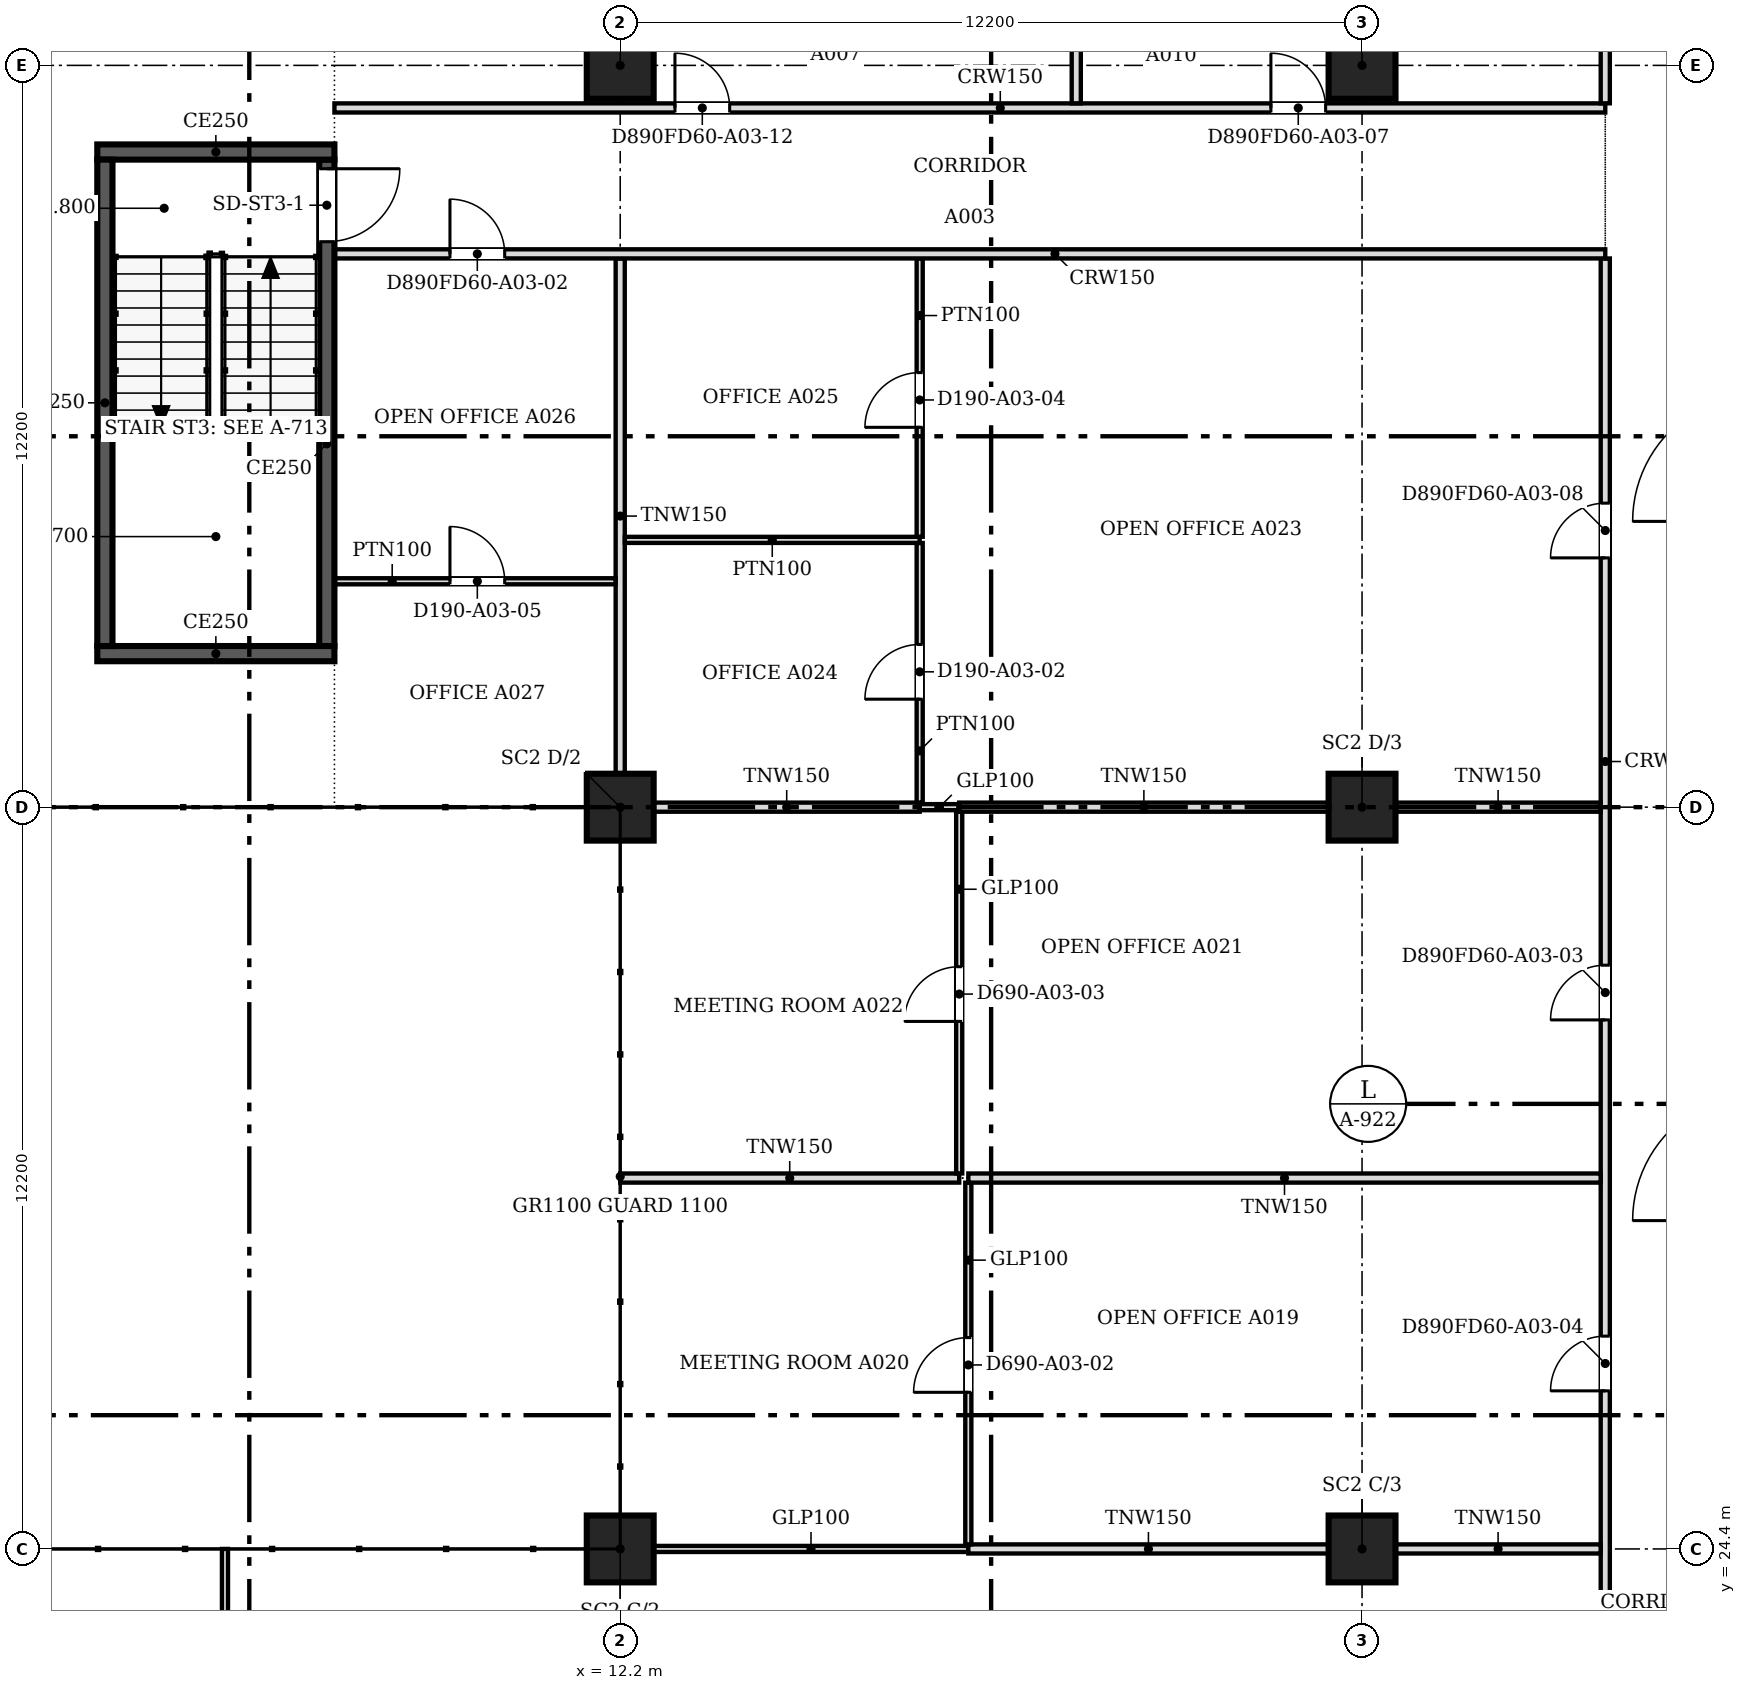
"""IFC4 building model, lengths in metres.
Left out: names, types, materials, properties, quantities, classifications, styles, units other than length and angle.
Written with IfcOpenShell. Run it as: python <this file> out.ifc"""

import sys

from ifc_helpers import new_model, si_unit, direction, frame, frame_2d, origin, origin_2d, place, context, subcontext, project, spatial, rectangle, extrude, source, transform, mapped, element, fill, save


model = new_model("IFC4")
c1 = context("Model", 3, precision=1e-05, world=origin(), true_north=direction((0.0, 1.0)))
c2 = subcontext(c1, "Body", "Model", "MODEL_VIEW")
j1 = project(units=[si_unit("LENGTHUNIT", "METRE"), si_unit("PLANEANGLEUNIT", "RADIAN")], contexts=[c1])
p1 = place(None, origin())
s1 = spatial("IfcSite", under=j1, at=p1, CompositionType="ELEMENT")
p2 = place(p1, origin())
s2 = spatial("IfcBuilding", under=s1, at=p2, CompositionType="ELEMENT")
p3 = place(p2, frame((0.0, 0.0, 41.0)))
s3 = spatial("IfcBuildingStorey", under=s2, at=p3, CompositionType="ELEMENT", Elevation=41.0)
for number, where, z_axis, x_axis in (
    (1, (12.2, 24.4, 0.0), (0.0, 0.0, 1.0), (1.0, 0.0, 0.0)),
    (2, (12.2, 36.6, 0.0), (0.0, 0.0, 1.0), (1.0, 0.0, 0.0)),
    (3, (12.2, 48.8, 0.0), (0.0, 0.0, 1.0), (1.0, 0.0, 0.0)),
    (4, (24.4, 24.4, 0.0), (0.0, 0.0, 1.0), (1.0, 0.0, 0.0)),
    (5, (24.4, 36.6, 0.0), (0.0, 0.0, 1.0), (1.0, 0.0, 0.0)),
    (6, (24.4, 48.8, 0.0), (0.0, 0.0, 1.0), (1.0, 0.0, 0.0)),
):
    element("IfcColumn", number, at=place(p3, frame(where, z_axis=z_axis, x_axis=x_axis)), inside=s3, PredefinedType="COLUMN", context=c2, shape_type="SweptSolid", body=[
        extrude(rectangle(XDim=1.1, YDim=1.1, at=origin_2d()), origin(), (0.0, 0.0, 1.0), 3.6),
    ])
p4 = place(p3, frame((7.5, 39.125, 0.0), z_axis=(0.0, 0.0, 1.0), x_axis=(-1.0, 0.0, 0.0)))
e7 = element("IfcWall", 7, at=p4, inside=s3, PredefinedType="SOLIDWALL", context=c2, shape_type="SweptSolid", body=[
    extrude(rectangle(XDim=3.9, YDim=0.25, at=frame_2d((1.95, 0.0))), origin(), (0.0, 0.0, 1.0), 3.8),
])
p5 = place(p3, frame((3.725, 39.25, 0.0), z_axis=(0.0, 0.0, 1.0), x_axis=(0.0, 1.0, 0.0)))
e8 = element("IfcWall", 8, at=p5, inside=s3, PredefinedType="SOLIDWALL", context=c2, shape_type="SweptSolid", body=[
    extrude(rectangle(XDim=8.0, YDim=0.25, at=frame_2d((4.0, 0.0))), origin(), (0.0, 0.0, 1.0), 3.8),
])
p6 = place(p3, frame((3.6, 47.375, 0.0), z_axis=(0.0, 0.0, 1.0), x_axis=(1.0, 0.0, 0.0)))
e9 = element("IfcWall", 9, at=p6, inside=s3, PredefinedType="SOLIDWALL", context=c2, shape_type="SweptSolid", body=[
    extrude(rectangle(XDim=3.9, YDim=0.25, at=frame_2d((1.95, 0.0))), origin(), (0.0, 0.0, 1.0), 3.8),
])
p7 = place(p3, frame((7.375, 47.25, 0.0), z_axis=(0.0, 0.0, 1.0), x_axis=(0.0, -1.0, 0.0)))
e10 = element("IfcWall", 10, at=p7, inside=s3, PredefinedType="SOLIDWALL", context=c2, shape_type="SweptSolid", body=[
    extrude(rectangle(XDim=8.0, YDim=0.25, at=frame_2d((4.0, 0.0))), origin(), (0.0, 0.0, 1.0), 3.8),
])
m1 = source(origin(), c2, "Body", "SweptSolid", [
    extrude(rectangle(XDim=1.2, YDim=2.1, at=frame_2d((0.6, 1.05))), frame((0.0, 0.135, 0.0), z_axis=(0.0, -1.0, 0.0), x_axis=(1.0, 0.0, 0.0)), (0.0, 0.0, 1.0), 0.27),
])
p8 = place(p7, frame((0.15, 0.0, 0.0)))
e11 = element("IfcOpeningElement", 11, at=p8, cuts=e10, PredefinedType="OPENING", context=c2, shape_type="MappedRepresentation", body=[
    mapped(m1, transform((0.0, 0.0, 0.0), scale=1.0)),
])
p9 = place(p3, frame((28.4, 18.8, 0.0), z_axis=(0.0, 0.0, 1.0), x_axis=(0.0, 1.0, 0.0)))
e12 = element("IfcWall", 12, at=p9, inside=s3, PredefinedType="PARTITIONING", context=c2, shape_type="SweptSolid", body=[
    extrude(rectangle(XDim=26.824, YDim=0.15, at=frame_2d((13.412, 0.0))), origin(), (0.0, 0.0, 1.0), 3.067),
])
m2 = source(origin(), c2, "Body", "SweptSolid", [
    extrude(rectangle(XDim=0.9, YDim=2.1, at=frame_2d((0.45, 1.05))), frame((0.0, 0.085, 0.0), z_axis=(0.0, -1.0, 0.0), x_axis=(1.0, 0.0, 0.0)), (0.0, 0.0, 1.0), 0.17),
])
p10 = place(p9, frame((1.3, 0.0, 0.0)))
e13 = element("IfcOpeningElement", 13, at=p10, cuts=e12, PredefinedType="OPENING", context=c2, shape_type="MappedRepresentation", body=[
    mapped(m2, transform((0.0, 0.0, 0.0), scale=1.0)),
])
p11 = place(p9, frame((14.301, 0.0, 0.0)))
e14 = element("IfcOpeningElement", 14, at=p11, cuts=e12, PredefinedType="OPENING", context=c2, shape_type="MappedRepresentation", body=[
    mapped(m2, transform((0.0, 0.0, 0.0), scale=1.0)),
])
p12 = place(p9, frame((8.2, 0.0, 0.0)))
e15 = element("IfcOpeningElement", 15, at=p12, cuts=e12, PredefinedType="OPENING", context=c2, shape_type="MappedRepresentation", body=[
    mapped(m2, transform((0.0, 0.0, 0.0), scale=1.0)),
])
p13 = place(p9, frame((21.9, 0.0, 0.0)))
e16 = element("IfcOpeningElement", 16, at=p13, cuts=e12, PredefinedType="OPENING", context=c2, shape_type="MappedRepresentation", body=[
    mapped(m2, transform((0.0, 0.0, 0.0), scale=1.0)),
])
p14 = place(p3, frame((5.7, 18.99, 0.0), z_axis=(0.0, 0.0, 1.0), x_axis=(0.0, 1.0, 0.0)))
e17 = element("IfcWall", 17, at=p14, inside=s3, PredefinedType="PARTITIONING", context=c2, shape_type="SweptSolid", body=[
    extrude(rectangle(XDim=5.41, YDim=0.1, at=frame_2d((2.705, 0.0))), origin(), (0.0, 0.0, 1.0), 3.067),
])
m3 = source(origin(), c2, "Body", "SweptSolid", [
    extrude(rectangle(XDim=0.9, YDim=2.1, at=frame_2d((0.45, 1.05))), frame((0.0, 0.06, 0.0), z_axis=(0.0, -1.0, 0.0), x_axis=(1.0, 0.0, 0.0)), (0.0, 0.0, 1.0), 0.12),
])
p15 = place(p14, frame((2.3, 0.0, 0.0)))
e18 = element("IfcOpeningElement", 18, at=p15, cuts=e17, PredefinedType="OPENING", context=c2, shape_type="MappedRepresentation", body=[
    mapped(m3, transform((0.0, 0.0, 0.0), scale=1.0)),
])
p16 = place(p3, frame((12.751, 24.4, 0.0), z_axis=(0.0, 0.0, 1.0), x_axis=(1.0, 0.0, 0.0)))
e19 = element("IfcWall", 19, at=p16, inside=s3, PredefinedType="PARTITIONING", context=c2, shape_type="SweptSolid", body=[
    extrude(rectangle(XDim=5.173, YDim=0.1, at=frame_2d((2.586, 0.0))), origin(), (0.0, 0.0, 1.0), 3.067),
])
p17 = place(p3, frame((17.925, 24.4, 0.0), z_axis=(0.0, 0.0, 1.0), x_axis=(1.0, 0.0, 0.0)))
e20 = element("IfcWall", 20, at=p17, inside=s3, PredefinedType="PARTITIONING", context=c2, shape_type="SweptSolid", body=[
    extrude(rectangle(XDim=5.924, YDim=0.15, at=frame_2d((2.962, 0.0))), origin(), (0.0, 0.0, 1.0), 3.067),
])
p18 = place(p3, frame((24.951, 24.4, 0.0), z_axis=(0.0, 0.0, 1.0), x_axis=(1.0, 0.0, 0.0)))
e21 = element("IfcWall", 21, at=p18, inside=s3, PredefinedType="PARTITIONING", context=c2, shape_type="SweptSolid", body=[
    extrude(rectangle(XDim=3.373, YDim=0.15, at=frame_2d((1.687, 0.0))), origin(), (0.0, 0.0, 1.0), 3.067),
])
p19 = place(p3, frame((17.925, 24.476, 0.0), z_axis=(0.0, 0.0, 1.0), x_axis=(0.0, 1.0, 0.0)))
e22 = element("IfcWall", 22, at=p19, inside=s3, PredefinedType="PARTITIONING", context=c2, shape_type="SweptSolid", body=[
    extrude(rectangle(XDim=5.948, YDim=0.1, at=frame_2d((2.974, 0.0))), origin(), (0.0, 0.0, 1.0), 3.067),
])
p20 = place(p19, frame((2.5, 0.0, 0.0)))
e23 = element("IfcOpeningElement", 23, at=p20, cuts=e22, PredefinedType="OPENING", context=c2, shape_type="MappedRepresentation", body=[
    mapped(m3, transform((0.0, 0.0, 0.0), scale=1.0)),
])
p21 = place(p3, frame((12.2, 30.5, 0.0), z_axis=(0.0, 0.0, 1.0), x_axis=(1.0, 0.0, 0.0)))
e24 = element("IfcWall", 24, at=p21, inside=s3, PredefinedType="PARTITIONING", context=c2, shape_type="SweptSolid", body=[
    extrude(rectangle(XDim=5.575, YDim=0.15, at=frame_2d((2.788, 0.0))), origin(), (0.0, 0.0, 1.0), 3.067),
])
p22 = place(p3, frame((17.925, 30.5, 0.0), z_axis=(0.0, 0.0, 1.0), x_axis=(1.0, 0.0, 0.0)))
e25 = element("IfcWall", 25, at=p22, inside=s3, PredefinedType="PARTITIONING", context=c2, shape_type="SweptSolid", body=[
    extrude(rectangle(XDim=10.399, YDim=0.15, at=frame_2d((5.199, 0.0))), origin(), (0.0, 0.0, 1.0), 3.067),
])
p23 = place(p3, frame((17.775, 30.576, 0.0), z_axis=(0.0, 0.0, 1.0), x_axis=(0.0, 1.0, 0.0)))
e26 = element("IfcWall", 26, at=p23, inside=s3, PredefinedType="PARTITIONING", context=c2, shape_type="SweptSolid", body=[
    extrude(rectangle(XDim=5.948, YDim=0.1, at=frame_2d((2.974, 0.0))), origin(), (0.0, 0.0, 1.0), 3.067),
])
p24 = place(p23, frame((2.5, 0.0, 0.0)))
e27 = element("IfcOpeningElement", 27, at=p24, cuts=e26, PredefinedType="OPENING", context=c2, shape_type="MappedRepresentation", body=[
    mapped(m3, transform((0.0, 0.0, 0.0), scale=1.0)),
])
p25 = place(p3, frame((12.751, 36.6, 0.0), z_axis=(0.0, 0.0, 1.0), x_axis=(1.0, 0.0, 0.0)))
e28 = element("IfcWall", 28, at=p25, inside=s3, PredefinedType="PARTITIONING", context=c2, shape_type="SweptSolid", body=[
    extrude(rectangle(XDim=4.374, YDim=0.15, at=frame_2d((2.187, 0.0))), origin(), (0.0, 0.0, 1.0), 3.067),
])
p26 = place(p3, frame((17.126, 36.6, 0.0), z_axis=(0.0, 0.0, 1.0), x_axis=(1.0, 0.0, 0.0)))
e29 = element("IfcWall", 29, at=p26, inside=s3, PredefinedType="PARTITIONING", context=c2, shape_type="SweptSolid", body=[
    extrude(rectangle(XDim=0.648, YDim=0.1, at=frame_2d((0.324, 0.0))), origin(), (0.0, 0.0, 1.0), 3.067),
])
p27 = place(p3, frame((17.775, 36.6, 0.0), z_axis=(0.0, 0.0, 1.0), x_axis=(1.0, 0.0, 0.0)))
e30 = element("IfcWall", 30, at=p27, inside=s3, PredefinedType="PARTITIONING", context=c2, shape_type="SweptSolid", body=[
    extrude(rectangle(XDim=6.074, YDim=0.15, at=frame_2d((3.037, 0.0))), origin(), (0.0, 0.0, 1.0), 3.067),
])
p28 = place(p3, frame((24.951, 36.6, 0.0), z_axis=(0.0, 0.0, 1.0), x_axis=(1.0, 0.0, 0.0)))
e31 = element("IfcWall", 31, at=p28, inside=s3, PredefinedType="PARTITIONING", context=c2, shape_type="SweptSolid", body=[
    extrude(rectangle(XDim=3.373, YDim=0.15, at=frame_2d((1.687, 0.0))), origin(), (0.0, 0.0, 1.0), 3.067),
])
p29 = place(p3, frame((17.125, 36.676, 0.0), z_axis=(0.0, 0.0, 1.0), x_axis=(0.0, 1.0, 0.0)))
e32 = element("IfcWall", 32, at=p29, inside=s3, PredefinedType="PARTITIONING", context=c2, shape_type="SweptSolid", body=[
    extrude(rectangle(XDim=4.269, YDim=0.1, at=frame_2d((2.135, 0.0))), origin(), (0.0, 0.0, 1.0), 3.067),
])
p30 = place(p29, frame((1.7, 0.0, 0.0)))
e33 = element("IfcOpeningElement", 33, at=p30, cuts=e32, PredefinedType="OPENING", context=c2, shape_type="MappedRepresentation", body=[
    mapped(m3, transform((0.0, 0.0, 0.0), scale=1.0)),
])
p31 = place(p3, frame((12.2, 37.151, 0.0), z_axis=(0.0, 0.0, 1.0), x_axis=(0.0, 1.0, 0.0)))
e34 = element("IfcWall", 34, at=p31, inside=s3, PredefinedType="PARTITIONING", context=c2, shape_type="SweptSolid", body=[
    extrude(rectangle(XDim=8.473, YDim=0.15, at=frame_2d((4.237, 0.0))), origin(), (0.0, 0.0, 1.0), 3.067),
])
p32 = place(p3, frame((12.124, 40.315, 0.0), z_axis=(0.0, 0.0, 1.0), x_axis=(-1.0, 0.0, 0.0)))
e35 = element("IfcWall", 35, at=p32, inside=s3, PredefinedType="PARTITIONING", context=c2, shape_type="SweptSolid", body=[
    extrude(rectangle(XDim=4.624, YDim=0.1, at=frame_2d((2.312, 0.0))), origin(), (0.0, 0.0, 1.0), 3.067),
])
p33 = place(p32, frame((1.824, 0.0, 0.0)))
e36 = element("IfcOpeningElement", 36, at=p33, cuts=e35, PredefinedType="OPENING", context=c2, shape_type="MappedRepresentation", body=[
    mapped(m3, transform((0.0, 0.0, 0.0), scale=1.0)),
])
p34 = place(p3, frame((12.276, 40.996, 0.0), z_axis=(0.0, 0.0, 1.0), x_axis=(1.0, 0.0, 0.0)))
e37 = element("IfcWall", 37, at=p34, inside=s3, PredefinedType="PARTITIONING", context=c2, shape_type="SweptSolid", body=[
    extrude(rectangle(XDim=4.849, YDim=0.1, at=frame_2d((2.425, 0.0))), origin(), (0.0, 0.0, 1.0), 3.067),
])
p35 = place(p3, frame((17.125, 41.047, 0.0), z_axis=(0.0, 0.0, 1.0), x_axis=(0.0, 1.0, 0.0)))
e38 = element("IfcWall", 38, at=p35, inside=s3, PredefinedType="PARTITIONING", context=c2, shape_type="SweptSolid", body=[
    extrude(rectangle(XDim=4.577, YDim=0.1, at=frame_2d((2.289, 0.0))), origin(), (0.0, 0.0, 1.0), 3.067),
])
p36 = place(p35, frame((1.8, 0.0, 0.0)))
e39 = element("IfcOpeningElement", 39, at=p36, cuts=e38, PredefinedType="OPENING", context=c2, shape_type="MappedRepresentation", body=[
    mapped(m3, transform((0.0, 0.0, 0.0), scale=1.0)),
])
p37 = place(p3, frame((28.4, 45.7, 0.0), z_axis=(0.0, 0.0, 1.0), x_axis=(-1.0, 0.0, 0.0)))
e40 = element("IfcWall", 40, at=p37, inside=s3, PredefinedType="PARTITIONING", context=c2, shape_type="SweptSolid", body=[
    extrude(rectangle(XDim=20.9, YDim=0.15, at=frame_2d((10.45, 0.0))), origin(), (0.0, 0.0, 1.0), 3.067),
])
p38 = place(p37, frame((18.1, 0.0, 0.0)))
e41 = element("IfcOpeningElement", 41, at=p38, cuts=e40, PredefinedType="OPENING", context=c2, shape_type="MappedRepresentation", body=[
    mapped(m2, transform((0.0, 0.0, 0.0), scale=1.0)),
])
p39 = place(p3, frame((7.5, 48.1, 0.0), z_axis=(0.0, 0.0, 1.0), x_axis=(1.0, 0.0, 0.0)))
e42 = element("IfcWall", 42, at=p39, inside=s3, PredefinedType="PARTITIONING", context=c2, shape_type="SweptSolid", body=[
    extrude(rectangle(XDim=20.9, YDim=0.15, at=frame_2d((10.45, 0.0))), origin(), (0.0, 0.0, 1.0), 3.067),
])
p40 = place(p39, frame((15.401, 0.0, 0.0)))
e43 = element("IfcOpeningElement", 43, at=p40, cuts=e42, PredefinedType="OPENING", context=c2, shape_type="MappedRepresentation", body=[
    mapped(m2, transform((0.0, 0.0, 0.0), scale=1.0)),
])
p41 = place(p39, frame((5.6, 0.0, 0.0)))
e44 = element("IfcOpeningElement", 44, at=p41, cuts=e42, PredefinedType="OPENING", context=c2, shape_type="MappedRepresentation", body=[
    mapped(m2, transform((0.0, 0.0, 0.0), scale=1.0)),
])
p42 = place(p3, frame((19.7, 48.176, 0.0), z_axis=(0.0, 0.0, 1.0), x_axis=(0.0, 1.0, 0.0)))
e45 = element("IfcWall", 45, at=p42, inside=s3, PredefinedType="PARTITIONING", context=c2, shape_type="SweptSolid", body=[
    extrude(rectangle(XDim=6.224, YDim=0.15, at=frame_2d((3.112, 0.0))), origin(), (0.0, 0.0, 1.0), 3.067),
])
p43 = place(p3, frame((28.4, 48.176, 0.0), z_axis=(0.0, 0.0, 1.0), x_axis=(0.0, 1.0, 0.0)))
e46 = element("IfcWall", 46, at=p43, inside=s3, PredefinedType="PARTITIONING", context=c2, shape_type="SweptSolid", body=[
    extrude(rectangle(XDim=2.648, YDim=0.15, at=frame_2d((1.324, 0.0))), origin(), (0.0, 0.0, 1.0), 3.067),
])
m4 = source(origin(), c2, "Body", "SweptSolid", [
    extrude(rectangle(XDim=1.2, YDim=2.1, at=frame_2d((0.6, 1.05))), frame((0.0, 0.025, 0.0), z_axis=(0.0, -1.0, 0.0), x_axis=(1.0, 0.0, 0.0)), (0.0, 0.0, 1.0), 0.05),
])
p44 = place(p8, origin())
e47 = element("IfcDoor", 47, at=p44, inside=s3, OperationType="SINGLE_SWING_LEFT", PredefinedType="DOOR", context=c2, shape_type="MappedRepresentation", body=[
    mapped(m4, transform((0.0, 0.0, 0.0), scale=1.0)),
])
fill(e11, e47)
m5 = source(origin(), c2, "Body", "SweptSolid", [
    extrude(rectangle(XDim=0.9, YDim=2.1, at=frame_2d((0.45, 1.05))), frame((0.0, 0.025, 0.0), z_axis=(0.0, -1.0, 0.0), x_axis=(1.0, 0.0, 0.0)), (0.0, 0.0, 1.0), 0.05),
])
p45 = place(p30, origin())
e48 = element("IfcDoor", 48, at=p45, inside=s3, OperationType="SINGLE_SWING_LEFT", PredefinedType="DOOR", context=c2, shape_type="MappedRepresentation", body=[
    mapped(m5, transform((0.0, 0.0, 0.0), scale=1.0)),
])
fill(e33, e48)
p46 = place(p36, origin())
e49 = element("IfcDoor", 49, at=p46, inside=s3, OperationType="SINGLE_SWING_LEFT", PredefinedType="DOOR", context=c2, shape_type="MappedRepresentation", body=[
    mapped(m5, transform((0.0, 0.0, 0.0), scale=1.0)),
])
fill(e39, e49)
p47 = place(p33, origin())
e50 = element("IfcDoor", 50, at=p47, inside=s3, OperationType="SINGLE_SWING_RIGHT", PredefinedType="DOOR", context=c2, shape_type="MappedRepresentation", body=[
    mapped(m5, transform((0.0, 0.0, 0.0), scale=1.0)),
])
fill(e36, e50)
p48 = place(p38, origin())
e51 = element("IfcDoor", 51, at=p48, inside=s3, OperationType="SINGLE_SWING_RIGHT", PredefinedType="DOOR", context=c2, shape_type="MappedRepresentation", body=[
    mapped(m5, transform((0.0, 0.0, 0.0), scale=1.0)),
])
fill(e41, e51)
p49 = place(p20, origin())
e52 = element("IfcDoor", 52, at=p49, inside=s3, OperationType="SINGLE_SWING_LEFT", PredefinedType="DOOR", context=c2, shape_type="MappedRepresentation", body=[
    mapped(m5, transform((0.0, 0.0, 0.0), scale=1.0)),
])
fill(e23, e52)
p50 = place(p24, origin())
e53 = element("IfcDoor", 53, at=p50, inside=s3, OperationType="SINGLE_SWING_LEFT", PredefinedType="DOOR", context=c2, shape_type="MappedRepresentation", body=[
    mapped(m5, transform((0.0, 0.0, 0.0), scale=1.0)),
])
fill(e27, e53)
p51 = place(p11, origin())
e54 = element("IfcDoor", 54, at=p51, inside=s3, OperationType="SINGLE_SWING_LEFT", PredefinedType="DOOR", context=c2, shape_type="MappedRepresentation", body=[
    mapped(m5, transform((0.0, 0.0, 0.0), scale=1.0)),
])
fill(e14, e54)
p52 = place(p12, origin())
e55 = element("IfcDoor", 55, at=p52, inside=s3, OperationType="SINGLE_SWING_LEFT", PredefinedType="DOOR", context=c2, shape_type="MappedRepresentation", body=[
    mapped(m5, transform((0.0, 0.0, 0.0), scale=1.0)),
])
fill(e15, e55)
p53 = place(p40, origin())
e56 = element("IfcDoor", 56, at=p53, inside=s3, OperationType="SINGLE_SWING_LEFT", PredefinedType="DOOR", context=c2, shape_type="MappedRepresentation", body=[
    mapped(m5, transform((0.0, 0.0, 0.0), scale=1.0)),
])
fill(e43, e56)
p54 = place(p13, origin())
e57 = element("IfcDoor", 57, at=p54, inside=s3, OperationType="SINGLE_SWING_LEFT", PredefinedType="DOOR", context=c2, shape_type="MappedRepresentation", body=[
    mapped(m5, transform((0.0, 0.0, 0.0), scale=1.0)),
])
fill(e16, e57)
p55 = place(p41, origin())
e58 = element("IfcDoor", 58, at=p55, inside=s3, OperationType="SINGLE_SWING_LEFT", PredefinedType="DOOR", context=c2, shape_type="MappedRepresentation", body=[
    mapped(m5, transform((0.0, 0.0, 0.0), scale=1.0)),
])
fill(e44, e58)
save(model, sys.argv[1])
